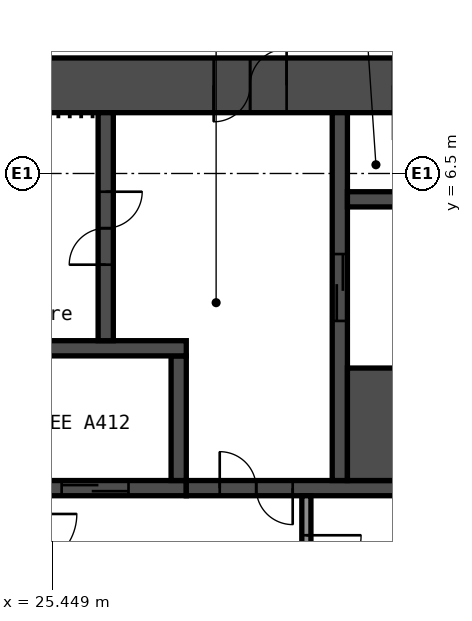
"""IFC4 building model, lengths in metres.
Left out: names, types, materials, properties, quantities, classifications, styles, units other than length and angle.
Written with IfcOpenShell. Run it as: python <this file> out.ifc"""

import sys

from ifc_helpers import new_model, si_unit, direction, frame, frame_2d, origin, place, context, subcontext, project, spatial, rectangle, extrude, element, fill, save


model = new_model("IFC4")
c1 = context("Model", 3, precision=1e-05, world=origin(), true_north=direction((0.0, 1.0)))
c2 = subcontext(c1, "Body", "Model", "MODEL_VIEW")
j1 = project(units=[si_unit("LENGTHUNIT", "METRE"), si_unit("PLANEANGLEUNIT", "RADIAN")], contexts=[c1])
p1 = place(None, origin())
s1 = spatial("IfcSite", under=j1, at=p1, CompositionType="ELEMENT")
p2 = place(p1, origin())
s2 = spatial("IfcBuilding", under=s1, at=p2, CompositionType="ELEMENT")
p3 = place(p2, frame((0.0, 0.0, 75.4)))
s3 = spatial("IfcBuildingStorey", under=s2, at=p3, CompositionType="ELEMENT", Elevation=75.4)
p4 = place(p3, frame((17.7, 7.95, 0.0), z_axis=(0.0, 0.0, 1.0), x_axis=(1.0, 0.0, 0.0)))
e1 = element("IfcWall", 1, at=p4, inside=s3, PredefinedType="SHEAR", context=c2, shape_type="SweptSolid", body=[
    extrude(rectangle(XDim=15.0, YDim=0.9, at=frame_2d((7.5, 0.0))), origin(), (0.0, 0.0, 1.0), 2.8),
])
p5 = place(p4, frame((10.4, 0.0, 0.0)))
e2 = element("IfcOpeningElement", 2, at=p5, cuts=e1, PredefinedType="OPENING", context=c2, shape_type="SweptSolid", body=[
    extrude(rectangle(XDim=1.2, YDim=2.1, at=frame_2d((0.6, 1.05))), frame((0.0, 0.46, 0.0), z_axis=(0.0, -1.0, 0.0), x_axis=(1.0, 0.0, 0.0)), (0.0, 0.0, 1.0), 0.92),
])
p6 = place(p4, frame((13.35, 0.0, 0.0)))
e3 = element("IfcOpeningElement", 3, at=p6, cuts=e1, PredefinedType="OPENING", context=c2, shape_type="SweptSolid", body=[
    extrude(rectangle(XDim=0.9, YDim=2.1, at=frame_2d((0.45, 1.05))), frame((0.0, 0.46, 0.0), z_axis=(0.0, -1.0, 0.0), x_axis=(1.0, 0.0, 0.0)), (0.0, 0.0, 1.0), 0.92),
])
p7 = place(p3, frame((20.15, 1.325, 0.0), z_axis=(0.0, 0.0, 1.0), x_axis=(1.0, 0.0, 0.0)))
e4 = element("IfcWall", 4, at=p7, inside=s3, PredefinedType="SHEAR", context=c2, shape_type="SweptSolid", body=[
    extrude(rectangle(XDim=7.5, YDim=0.25, at=frame_2d((3.75, 0.0))), origin(), (0.0, 0.0, 1.0), 2.8),
])
p8 = place(p7, frame((0.65, 0.0, 0.0)))
e5 = element("IfcOpeningElement", 5, at=p8, cuts=e4, PredefinedType="OPENING", context=c2, shape_type="SweptSolid", body=[
    extrude(rectangle(XDim=1.1, YDim=2.1, at=frame_2d((0.55, 1.05))), frame((0.0, 0.135, 0.0), z_axis=(0.0, -1.0, 0.0), x_axis=(1.0, 0.0, 0.0)), (0.0, 0.0, 1.0), 0.27),
])
p9 = place(p7, frame((3.05, 0.0, 0.0)))
e6 = element("IfcOpeningElement", 6, at=p9, cuts=e4, PredefinedType="OPENING", context=c2, shape_type="SweptSolid", body=[
    extrude(rectangle(XDim=1.1, YDim=2.1, at=frame_2d((0.55, 1.05))), frame((0.0, 0.135, 0.0), z_axis=(0.0, -1.0, 0.0), x_axis=(1.0, 0.0, 0.0)), (0.0, 0.0, 1.0), 0.27),
])
p10 = place(p7, frame((5.45, 0.0, 0.0)))
e7 = element("IfcOpeningElement", 7, at=p10, cuts=e4, PredefinedType="OPENING", context=c2, shape_type="SweptSolid", body=[
    extrude(rectangle(XDim=1.1, YDim=2.1, at=frame_2d((0.55, 1.05))), frame((0.0, 0.135, 0.0), z_axis=(0.0, -1.0, 0.0), x_axis=(1.0, 0.0, 0.0)), (0.0, 0.0, 1.0), 0.27),
])
p11 = place(p3, frame((27.525, 1.45, 0.0), z_axis=(0.0, 0.0, 1.0), x_axis=(0.0, 1.0, 0.0)))
e8 = element("IfcWall", 8, at=p11, inside=s3, PredefinedType="SHEAR", context=c2, shape_type="SweptSolid", body=[
    extrude(rectangle(XDim=2.05, YDim=0.25, at=frame_2d((1.025, 0.0))), origin(), (0.0, 0.0, 1.0), 2.8),
])
p12 = place(p3, frame((20.15, 3.625, 0.0), z_axis=(0.0, 0.0, 1.0), x_axis=(1.0, 0.0, 0.0)))
e9 = element("IfcWall", 9, at=p12, inside=s3, PredefinedType="SHEAR", context=c2, shape_type="SweptSolid", body=[
    extrude(rectangle(XDim=7.5, YDim=0.25, at=frame_2d((3.75, 0.0))), origin(), (0.0, 0.0, 1.0), 2.8),
])
p13 = place(p3, frame((26.325, 3.75, 0.0), z_axis=(0.0, 0.0, 1.0), x_axis=(0.0, 1.0, 0.0)))
e10 = element("IfcWall", 10, at=p13, inside=s3, PredefinedType="SHEAR", context=c2, shape_type="SweptSolid", body=[
    extrude(rectangle(XDim=3.75, YDim=0.25, at=frame_2d((1.875, 0.0))), origin(), (0.0, 0.0, 1.0), 2.8),
])
p14 = place(p13, frame((1.25, 0.0, 0.0)))
e11 = element("IfcOpeningElement", 11, at=p14, cuts=e10, PredefinedType="OPENING", context=c2, shape_type="SweptSolid", body=[
    extrude(rectangle(XDim=1.2, YDim=2.1, at=frame_2d((0.6, 1.05))), frame((0.0, 0.135, 0.0), z_axis=(0.0, -1.0, 0.0), x_axis=(1.0, 0.0, 0.0)), (0.0, 0.0, 1.0), 0.27),
])
p15 = place(p3, frame((27.65, 1.325, 0.0), z_axis=(0.0, 0.0, 1.0), x_axis=(1.0, 0.0, 0.0)))
e12 = element("IfcWall", 12, at=p15, inside=s3, PredefinedType="SHEAR", context=c2, shape_type="SweptSolid", body=[
    extrude(rectangle(XDim=5.05, YDim=0.25, at=frame_2d((2.525, 0.0))), origin(), (0.0, 0.0, 1.0), 2.8),
])
p16 = place(p15, frame((0.55, 0.0, 0.0)))
e13 = element("IfcOpeningElement", 13, at=p16, cuts=e12, PredefinedType="OPENING", context=c2, shape_type="SweptSolid", body=[
    extrude(rectangle(XDim=1.2, YDim=2.1, at=frame_2d((0.6, 1.05))), frame((0.0, 0.135, 0.0), z_axis=(0.0, -1.0, 0.0), x_axis=(1.0, 0.0, 0.0)), (0.0, 0.0, 1.0), 0.27),
])
p17 = place(p3, frame((30.175, 1.45, 0.0), z_axis=(0.0, 0.0, 1.0), x_axis=(0.0, 1.0, 0.0)))
e14 = element("IfcWall", 14, at=p17, inside=s3, PredefinedType="SHEAR", context=c2, shape_type="SweptSolid", body=[
    extrude(rectangle(XDim=6.05, YDim=0.25, at=frame_2d((3.025, 0.0))), origin(), (0.0, 0.0, 1.0), 2.8),
])
p18 = place(p17, frame((2.625, 0.0, 0.0)))
e15 = element("IfcOpeningElement", 15, at=p18, cuts=e14, PredefinedType="OPENING", context=c2, shape_type="SweptSolid", body=[
    extrude(rectangle(XDim=1.1, YDim=2.1, at=frame_2d((0.55, 1.05))), frame((0.0, 0.135, 0.0), z_axis=(0.0, -1.0, 0.0), x_axis=(1.0, 0.0, 0.0)), (0.0, 0.0, 1.0), 0.27),
])
p19 = place(p3, frame((30.3, 2.375, 0.0), z_axis=(0.0, 0.0, 1.0), x_axis=(1.0, 0.0, 0.0)))
e16 = element("IfcWall", 16, at=p19, inside=s3, PredefinedType="SHEAR", context=c2, shape_type="SweptSolid", body=[
    extrude(rectangle(XDim=2.4, YDim=1.85, at=frame_2d((1.2, 0.0))), origin(), (0.0, 0.0, 1.0), 2.8),
])
p20 = place(p3, frame((30.3, 6.075, 0.0), z_axis=(0.0, 0.0, 1.0), x_axis=(1.0, 0.0, 0.0)))
e17 = element("IfcWall", 17, at=p20, inside=s3, PredefinedType="SHEAR", context=c2, shape_type="SweptSolid", body=[
    extrude(rectangle(XDim=2.4, YDim=0.25, at=frame_2d((1.2, 0.0))), origin(), (0.0, 0.0, 1.0), 2.8),
])
p21 = place(p3, frame((29.625, -1.15, 0.0), z_axis=(0.0, 0.0, 1.0), x_axis=(0.0, 1.0, 0.0)))
e18 = element("IfcWall", 18, at=p21, inside=s3, PredefinedType="PARTITIONING", context=c2, shape_type="SweptSolid", body=[
    extrude(rectangle(XDim=2.35, YDim=0.15, at=frame_2d((1.175, 0.0))), origin(), (0.0, 0.0, 1.0), 2.8),
])
p22 = place(p21, frame((0.8, 0.0, 0.0)))
e19 = element("IfcOpeningElement", 19, at=p22, cuts=e18, PredefinedType="OPENING", context=c2, shape_type="SweptSolid", body=[
    extrude(rectangle(XDim=0.9, YDim=2.1, at=frame_2d((0.45, 1.05))), frame((0.0, 0.085, 0.0), z_axis=(0.0, -1.0, 0.0), x_axis=(1.0, 0.0, 0.0)), (0.0, 0.0, 1.0), 0.17),
])
p23 = place(p5, origin())
e20 = element("IfcDoor", 20, at=p23, inside=s3, OperationType="DOUBLE_DOOR_SINGLE_SWING", PredefinedType="DOOR", context=c2, shape_type="SweptSolid", body=[
    extrude(rectangle(XDim=1.2, YDim=2.1, at=frame_2d((0.6, 1.05))), frame((0.0, 0.025, 0.0), z_axis=(0.0, -1.0, 0.0), x_axis=(1.0, 0.0, 0.0)), (0.0, 0.0, 1.0), 0.05),
])
fill(e2, e20)
p24 = place(p14, origin())
e21 = element("IfcDoor", 21, at=p24, inside=s3, OperationType="DOUBLE_DOOR_SINGLE_SWING", PredefinedType="DOOR", context=c2, shape_type="SweptSolid", body=[
    extrude(rectangle(XDim=1.2, YDim=2.1, at=frame_2d((0.6, 1.05))), frame((0.0, 0.025, 0.0), z_axis=(0.0, -1.0, 0.0), x_axis=(1.0, 0.0, 0.0)), (0.0, 0.0, 1.0), 0.05),
])
fill(e11, e21)
p25 = place(p16, origin())
e22 = element("IfcDoor", 22, at=p25, inside=s3, OperationType="DOUBLE_DOOR_SINGLE_SWING", PredefinedType="DOOR", context=c2, shape_type="SweptSolid", body=[
    extrude(rectangle(XDim=1.2, YDim=2.1, at=frame_2d((0.6, 1.05))), frame((0.0, 0.025, 0.0), z_axis=(0.0, -1.0, 0.0), x_axis=(1.0, 0.0, 0.0)), (0.0, 0.0, 1.0), 0.05),
])
fill(e13, e22)
p26 = place(p22, origin())
e23 = element("IfcDoor", 23, at=p26, inside=s3, OperationType="SINGLE_SWING_RIGHT", PredefinedType="DOOR", context=c2, shape_type="SweptSolid", body=[
    extrude(rectangle(XDim=0.9, YDim=2.1, at=frame_2d((0.45, 1.05))), frame((0.0, 0.025, 0.0), z_axis=(0.0, -1.0, 0.0), x_axis=(1.0, 0.0, 0.0)), (0.0, 0.0, 1.0), 0.05),
])
fill(e19, e23)
p27 = place(p10, origin())
e24 = element("IfcDoor", 24, at=p27, inside=s3, OperationType="DOUBLE_DOOR_SLIDING", PredefinedType="DOOR", context=c2, shape_type="SweptSolid", body=[
    extrude(rectangle(XDim=1.1, YDim=2.1, at=frame_2d((0.55, 1.05))), frame((0.0, 0.025, 0.0), z_axis=(0.0, -1.0, 0.0), x_axis=(1.0, 0.0, 0.0)), (0.0, 0.0, 1.0), 0.05),
])
fill(e7, e24)
p28 = place(p18, origin())
e25 = element("IfcDoor", 25, at=p28, inside=s3, OperationType="DOUBLE_DOOR_SLIDING", PredefinedType="DOOR", context=c2, shape_type="SweptSolid", body=[
    extrude(rectangle(XDim=1.1, YDim=2.1, at=frame_2d((0.55, 1.05))), frame((0.0, 0.025, 0.0), z_axis=(0.0, -1.0, 0.0), x_axis=(1.0, 0.0, 0.0)), (0.0, 0.0, 1.0), 0.05),
])
fill(e15, e25)
save(model, sys.argv[1])
